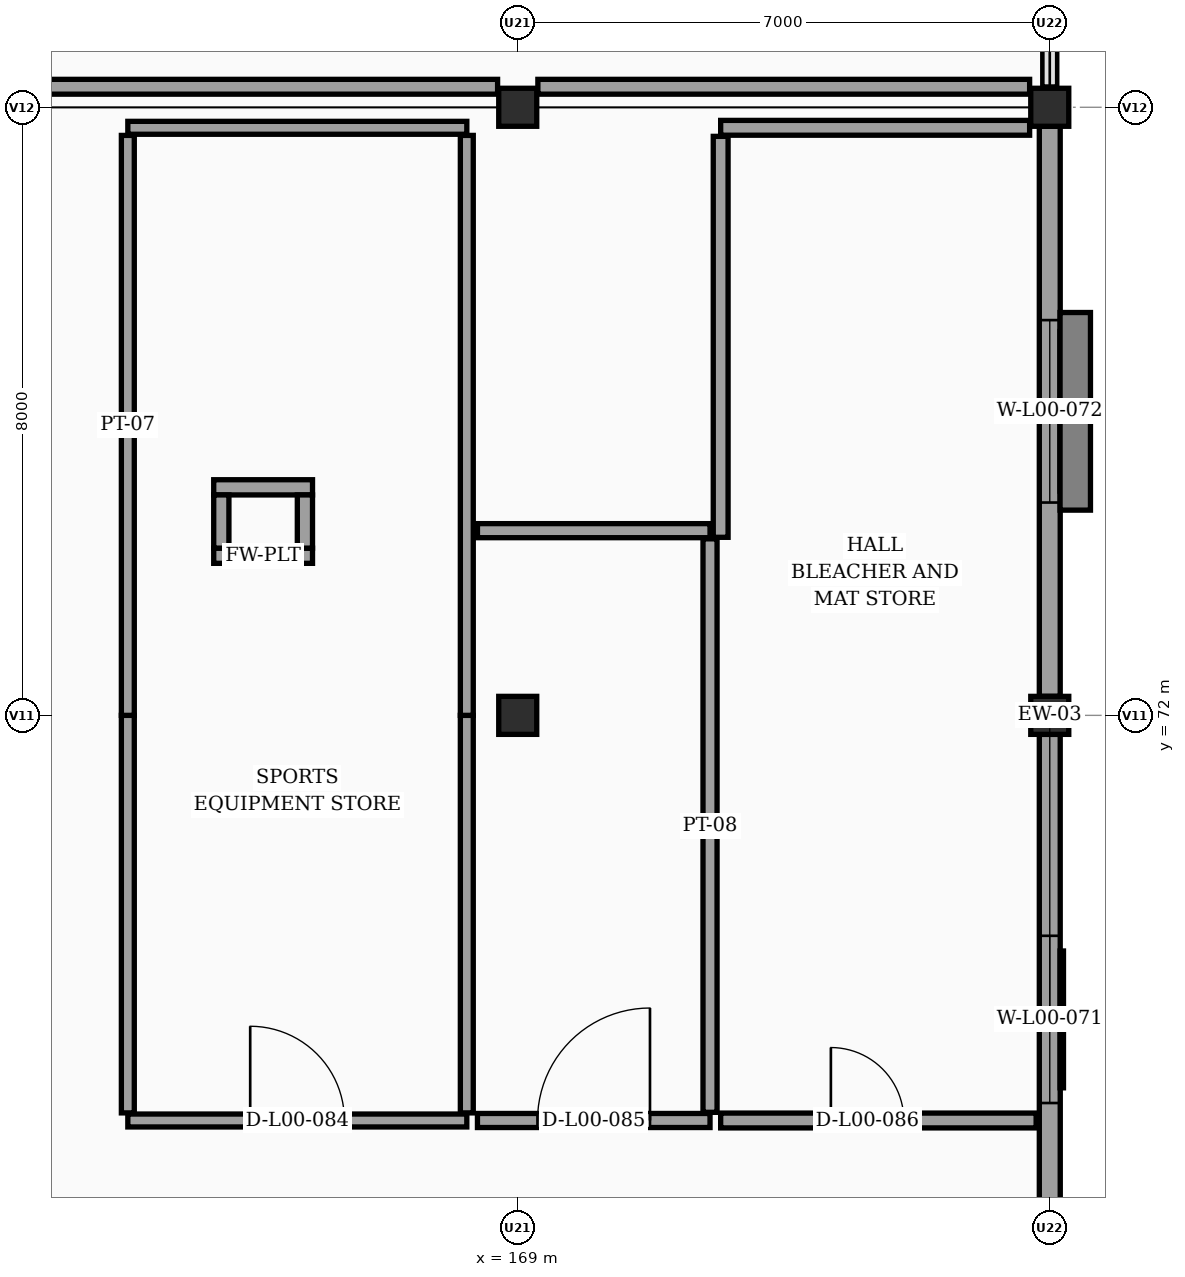
"""IFC4 building model, lengths in metres.
Left out: names, types, materials, properties, quantities, classifications, styles, units other than length and angle.
Written with IfcOpenShell. Run it as: python <this file> out.ifc"""

import sys

from ifc_helpers import new_model, si_unit, direction, frame, frame_2d, origin, origin_2d, place, context, subcontext, project, spatial, rectangle, extrude, element, fill, save


model = new_model("IFC4")
c1 = context("Model", 3, precision=1e-05, world=origin(), true_north=direction((0.0, 1.0)))
c2 = subcontext(c1, "Body", "Model", "MODEL_VIEW")
j1 = project(units=[si_unit("LENGTHUNIT", "METRE"), si_unit("PLANEANGLEUNIT", "RADIAN")], contexts=[c1])
p1 = place(None, origin())
s1 = spatial("IfcSite", under=j1, at=p1, CompositionType="ELEMENT")
p2 = place(p1, origin())
s2 = spatial("IfcBuilding", under=s1, at=p2, CompositionType="ELEMENT")
p3 = place(p2, origin())
s3 = spatial("IfcBuildingStorey", under=s2, at=p3, CompositionType="ELEMENT", Elevation=0.0)
for number, where, z_axis, x_axis in (
    (1, (169.0, 72.0, -0.2), (0.0, 0.0, 1.0), (1.0, 0.0, 0.0)),
    (2, (169.0, 80.0, -0.2), (0.0, 0.0, 1.0), (1.0, 0.0, 0.0)),
    (3, (176.0, 72.0, -0.2), (0.0, 0.0, 1.0), (1.0, 0.0, 0.0)),
    (4, (176.0, 80.0, -0.2), (0.0, 0.0, 1.0), (1.0, 0.0, 0.0)),
):
    element("IfcColumn", number, at=place(p3, frame(where, z_axis=z_axis, x_axis=x_axis)), inside=s3, PredefinedType="COLUMN", context=c2, shape_type="SweptSolid", body=[
        extrude(rectangle(XDim=0.5, YDim=0.5, at=origin_2d()), origin(), (0.0, 0.0, 1.0), 4.7),
    ])
p4 = place(p3, frame((176.0, 71.75, 0.0), z_axis=(0.0, 0.0, 1.0), x_axis=(0.0, -1.0, 0.0)))
e5 = element("IfcWall", 5, at=p4, inside=s3, PredefinedType="SOLIDWALL", context=c2, shape_type="SweptSolid", body=[
    extrude(rectangle(XDim=7.5, YDim=0.275, at=frame_2d((3.75, 0.0))), origin(), (0.0, 0.0, 1.0), 3.515),
])
p5 = place(p4, frame((2.65, 0.0, 0.95)))
e6 = element("IfcOpeningElement", 6, at=p5, cuts=e5, PredefinedType="OPENING", context=c2, shape_type="SweptSolid", body=[
    extrude(rectangle(XDim=2.2, YDim=1.5, at=frame_2d((1.1, 0.75))), frame((0.0, 0.147, 0.0), z_axis=(0.0, -1.0, 0.0), x_axis=(1.0, 0.0, 0.0)), (0.0, 0.0, 1.0), 0.295),
])
p6 = place(p3, frame((176.0, 79.75, 0.0), z_axis=(0.0, 0.0, 1.0), x_axis=(0.0, -1.0, 0.0)))
e7 = element("IfcWall", 7, at=p6, inside=s3, PredefinedType="SOLIDWALL", context=c2, shape_type="SweptSolid", body=[
    extrude(rectangle(XDim=7.5, YDim=0.275, at=frame_2d((3.75, 0.0))), origin(), (0.0, 0.0, 1.0), 3.515),
])
p7 = place(p6, frame((2.55, 0.0, 0.95)))
e8 = element("IfcOpeningElement", 8, at=p7, cuts=e7, PredefinedType="OPENING", context=c2, shape_type="SweptSolid", body=[
    extrude(rectangle(XDim=2.4, YDim=1.5, at=frame_2d((1.2, 0.75))), frame((0.0, 0.147, 0.0), z_axis=(0.0, -1.0, 0.0), x_axis=(1.0, 0.0, 0.0)), (0.0, 0.0, 1.0), 0.295),
])
p8 = place(p3, frame((176.0, 87.75, 0.0), z_axis=(0.0, 0.0, 1.0), x_axis=(0.0, -1.0, 0.0)))
e9 = element("IfcWall", 9, at=p8, inside=s3, PredefinedType="SOLIDWALL", context=c2, shape_type="SweptSolid", body=[
    extrude(rectangle(XDim=7.5, YDim=0.185, at=frame_2d((3.75, 0.0))), origin(), (0.0, 0.0, 1.0), 0.95),
])
for number, where, z_axis, x_axis in (
    (10, (166.3, 74.1, 0.0), (0.0, 0.0, 1.0), (-1.0, 0.0, 0.0)),
    (11, (165.0, 75.0, 0.0), (0.0, 0.0, 1.0), (1.0, 0.0, 0.0)),
):
    element("IfcWall", number, at=place(p3, frame(where, z_axis=z_axis, x_axis=x_axis)), inside=s3, PredefinedType="PARTITIONING", context=c2, shape_type="SweptSolid", body=[
        extrude(rectangle(XDim=1.3, YDim=0.2, at=frame_2d((0.65, 0.0))), origin(), (0.0, 0.0, 1.0), 4.24),
    ])
for number, where, z_axis, x_axis in (
    (12, (165.1, 74.2, 0.0), (0.0, 0.0, 1.0), (0.0, 1.0, 0.0)),
    (13, (166.2, 74.9, 0.0), (0.0, 0.0, 1.0), (0.0, -1.0, 0.0)),
):
    element("IfcWall", number, at=place(p3, frame(where, z_axis=z_axis, x_axis=x_axis)), inside=s3, PredefinedType="PARTITIONING", context=c2, shape_type="SweptSolid", body=[
        extrude(rectangle(XDim=0.7, YDim=0.2, at=frame_2d((0.35, 0.0))), origin(), (0.0, 0.0, 1.0), 4.24),
    ])
p9 = place(p3, frame((163.87, 66.67, 0.0), z_axis=(0.0, 0.0, 1.0), x_axis=(1.0, 0.0, 0.0)))
e14 = element("IfcWall", 14, at=p9, inside=s3, PredefinedType="PARTITIONING", context=c2, shape_type="SweptSolid", body=[
    extrude(rectangle(XDim=4.46, YDim=0.17, at=frame_2d((2.23, 0.0))), origin(), (0.0, 0.0, 1.0), 4.24),
])
p10 = place(p9, frame((1.61, 0.0, 0.0)))
e15 = element("IfcOpeningElement", 15, at=p10, cuts=e14, PredefinedType="OPENING", context=c2, shape_type="SweptSolid", body=[
    extrude(rectangle(XDim=1.24, YDim=2.25, at=frame_2d((0.62, 1.125))), frame((0.0, 0.095, 0.0), z_axis=(0.0, -1.0, 0.0), x_axis=(1.0, 0.0, 0.0)), (0.0, 0.0, 1.0), 0.19),
])
p11 = place(p3, frame((163.87, 79.73, 0.0), z_axis=(0.0, 0.0, 1.0), x_axis=(1.0, 0.0, 0.0)))
e16 = element("IfcWall", 16, at=p11, inside=s3, PredefinedType="PARTITIONING", context=c2, shape_type="SweptSolid", body=[
    extrude(rectangle(XDim=4.46, YDim=0.17, at=frame_2d((2.23, 0.0))), origin(), (0.0, 0.0, 1.0), 3.565),
])
p12 = place(p3, frame((163.87, 66.77, 0.0), z_axis=(0.0, 0.0, 1.0), x_axis=(0.0, 1.0, 0.0)))
e17 = element("IfcWall", 17, at=p12, inside=s3, PredefinedType="PARTITIONING", context=c2, shape_type="SweptSolid", body=[
    extrude(rectangle(XDim=5.23, YDim=0.17, at=frame_2d((2.615, 0.0))), origin(), (0.0, 0.0, 1.0), 4.24),
])
p13 = place(p3, frame((163.87, 72.0, 0.0), z_axis=(0.0, 0.0, 1.0), x_axis=(0.0, 1.0, 0.0)))
e18 = element("IfcWall", 18, at=p13, inside=s3, PredefinedType="PARTITIONING", context=c2, shape_type="SweptSolid", body=[
    extrude(rectangle(XDim=7.63, YDim=0.17, at=frame_2d((3.815, 0.0))), origin(), (0.0, 0.0, 1.0), 4.24),
])
p14 = place(p3, frame((168.33, 66.77, 0.0), z_axis=(0.0, 0.0, 1.0), x_axis=(0.0, 1.0, 0.0)))
e19 = element("IfcWall", 19, at=p14, inside=s3, PredefinedType="PARTITIONING", context=c2, shape_type="SweptSolid", body=[
    extrude(rectangle(XDim=5.23, YDim=0.17, at=frame_2d((2.615, 0.0))), origin(), (0.0, 0.0, 1.0), 4.24),
])
p15 = place(p3, frame((168.33, 72.0, 0.0), z_axis=(0.0, 0.0, 1.0), x_axis=(0.0, 1.0, 0.0)))
e20 = element("IfcWall", 20, at=p15, inside=s3, PredefinedType="PARTITIONING", context=c2, shape_type="SweptSolid", body=[
    extrude(rectangle(XDim=7.63, YDim=0.17, at=frame_2d((3.815, 0.0))), origin(), (0.0, 0.0, 1.0), 4.24),
])
p16 = place(p3, frame((168.47, 66.67, 0.0), z_axis=(0.0, 0.0, 1.0), x_axis=(1.0, 0.0, 0.0)))
e21 = element("IfcWall", 21, at=p16, inside=s3, PredefinedType="PARTITIONING", context=c2, shape_type="SweptSolid", body=[
    extrude(rectangle(XDim=3.06, YDim=0.185, at=frame_2d((1.53, 0.0))), origin(), (0.0, 0.0, 1.0), 4.24),
])
p17 = place(p16, frame((0.79, 0.0, 0.0)))
e22 = element("IfcOpeningElement", 22, at=p17, cuts=e21, PredefinedType="OPENING", context=c2, shape_type="SweptSolid", body=[
    extrude(rectangle(XDim=1.48, YDim=2.25, at=frame_2d((0.74, 1.125))), frame((0.0, 0.103, 0.0), z_axis=(0.0, -1.0, 0.0), x_axis=(1.0, 0.0, 0.0)), (0.0, 0.0, 1.0), 0.205),
])
p18 = place(p3, frame((168.47, 74.43, 0.0), z_axis=(0.0, 0.0, 1.0), x_axis=(1.0, 0.0, 0.0)))
e23 = element("IfcWall", 23, at=p18, inside=s3, PredefinedType="PARTITIONING", context=c2, shape_type="SweptSolid", body=[
    extrude(rectangle(XDim=3.06, YDim=0.185, at=frame_2d((1.53, 0.0))), origin(), (0.0, 0.0, 1.0), 4.24),
])
p19 = place(p3, frame((171.53, 66.778, 0.0), z_axis=(0.0, 0.0, 1.0), x_axis=(0.0, 1.0, 0.0)))
e24 = element("IfcWall", 24, at=p19, inside=s3, PredefinedType="PARTITIONING", context=c2, shape_type="SweptSolid", body=[
    extrude(rectangle(XDim=7.545, YDim=0.185, at=frame_2d((3.772, 0.0))), origin(), (0.0, 0.0, 1.0), 3.815),
])
p20 = place(p3, frame((171.67, 66.67, 0.0), z_axis=(0.0, 0.0, 1.0), x_axis=(1.0, 0.0, 0.0)))
e25 = element("IfcWall", 25, at=p20, inside=s3, PredefinedType="PARTITIONING", context=c2, shape_type="SweptSolid", body=[
    extrude(rectangle(XDim=4.151, YDim=0.195, at=frame_2d((2.075, 0.0))), origin(), (0.0, 0.0, 1.0), 4.24),
])
p21 = place(p20, frame((1.45, 0.0, 0.0)))
e26 = element("IfcOpeningElement", 26, at=p21, cuts=e25, PredefinedType="OPENING", context=c2, shape_type="SweptSolid", body=[
    extrude(rectangle(XDim=0.96, YDim=2.15, at=frame_2d((0.48, 1.075))), frame((0.0, 0.107, 0.0), z_axis=(0.0, -1.0, 0.0), x_axis=(1.0, 0.0, 0.0)), (0.0, 0.0, 1.0), 0.215),
])
p22 = place(p3, frame((171.67, 79.73, 0.0), z_axis=(0.0, 0.0, 1.0), x_axis=(1.0, 0.0, 0.0)))
e27 = element("IfcWall", 27, at=p22, inside=s3, PredefinedType="PARTITIONING", context=c2, shape_type="SweptSolid", body=[
    extrude(rectangle(XDim=4.065, YDim=0.195, at=frame_2d((2.033, 0.0))), origin(), (0.0, 0.0, 1.0), 3.565),
])
p23 = place(p3, frame((171.67, 74.343, 0.0), z_axis=(0.0, 0.0, 1.0), x_axis=(0.0, 1.0, 0.0)))
e28 = element("IfcWall", 28, at=p23, inside=s3, PredefinedType="PARTITIONING", context=c2, shape_type="SweptSolid", body=[
    extrude(rectangle(XDim=5.275, YDim=0.195, at=frame_2d((2.637, 0.0))), origin(), (0.0, 0.0, 1.0), 3.815),
])
for number, where, z_axis, x_axis in (
    (29, (162.265, 80.27, 0.0), (0.0, 0.0, 1.0), (1.0, 0.0, 0.0)),
    (30, (169.265, 80.27, 0.0), (0.0, 0.0, 1.0), (1.0, 0.0, 0.0)),
):
    element("IfcWall", number, at=place(p3, frame(where, z_axis=z_axis, x_axis=x_axis)), inside=s3, PredefinedType="PARTITIONING", context=c2, shape_type="SweptSolid", body=[
        extrude(rectangle(XDim=6.47, YDim=0.195, at=frame_2d((3.235, 0.0))), origin(), (0.0, 0.0, 1.0), 3.565),
    ])
p24 = place(p5, origin())
e31 = element("IfcWindow", 31, at=p24, inside=s3, PartitioningType="DOUBLE_PANEL_VERTICAL", PredefinedType="WINDOW", context=c2, shape_type="SweptSolid", body=[
    extrude(rectangle(XDim=2.2, YDim=1.5, at=frame_2d((1.1, 0.75))), frame((0.0, 0.03, 0.0), z_axis=(0.0, -1.0, 0.0), x_axis=(1.0, 0.0, 0.0)), (0.0, 0.0, 1.0), 0.06),
])
fill(e6, e31)
p25 = place(p7, origin())
e32 = element("IfcWindow", 32, at=p25, inside=s3, PartitioningType="DOUBLE_PANEL_VERTICAL", PredefinedType="WINDOW", context=c2, shape_type="SweptSolid", body=[
    extrude(rectangle(XDim=2.4, YDim=1.5, at=frame_2d((1.2, 0.75))), frame((0.0, 0.03, 0.0), z_axis=(0.0, -1.0, 0.0), x_axis=(1.0, 0.0, 0.0)), (0.0, 0.0, 1.0), 0.06),
])
fill(e8, e32)
p26 = place(p10, origin())
e33 = element("IfcDoor", 33, at=p26, inside=s3, OperationType="SINGLE_SWING_LEFT", PredefinedType="DOOR", context=c2, shape_type="SweptSolid", body=[
    extrude(rectangle(XDim=1.24, YDim=2.25, at=frame_2d((0.62, 1.125))), frame((0.0, 0.025, 0.0), z_axis=(0.0, -1.0, 0.0), x_axis=(1.0, 0.0, 0.0)), (0.0, 0.0, 1.0), 0.05),
])
fill(e15, e33)
p27 = place(p17, origin())
e34 = element("IfcDoor", 34, at=p27, inside=s3, OperationType="SINGLE_SWING_RIGHT", PredefinedType="DOOR", context=c2, shape_type="SweptSolid", body=[
    extrude(rectangle(XDim=1.48, YDim=2.25, at=frame_2d((0.74, 1.125))), frame((0.0, 0.025, 0.0), z_axis=(0.0, -1.0, 0.0), x_axis=(1.0, 0.0, 0.0)), (0.0, 0.0, 1.0), 0.05),
])
fill(e22, e34)
p28 = place(p21, origin())
e35 = element("IfcDoor", 35, at=p28, inside=s3, OperationType="SINGLE_SWING_LEFT", PredefinedType="DOOR", context=c2, shape_type="SweptSolid", body=[
    extrude(rectangle(XDim=0.96, YDim=2.15, at=frame_2d((0.48, 1.075))), frame((0.0, 0.025, 0.0), z_axis=(0.0, -1.0, 0.0), x_axis=(1.0, 0.0, 0.0)), (0.0, 0.0, 1.0), 0.05),
])
fill(e26, e35)
save(model, sys.argv[1])
